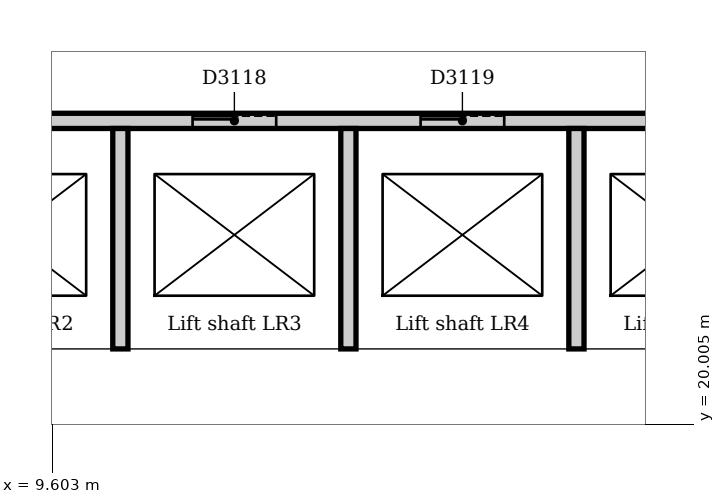
"""IFC4 building model, lengths in metres.
Left out: names, types, materials, properties, quantities, classifications, styles, units other than length and angle.
Written with IfcOpenShell. Run it as: python <this file> out.ifc"""

import sys

from ifc_helpers import new_model, si_unit, direction, frame, frame_2d, origin, place, context, subcontext, project, spatial, rectangle, extrude, element, fill, save


model = new_model("IFC4")
c1 = context("Model", 3, precision=1e-05, world=origin(), true_north=direction((0.0, 1.0)))
c2 = subcontext(c1, "Body", "Model", "MODEL_VIEW")
j1 = project(units=[si_unit("LENGTHUNIT", "METRE"), si_unit("PLANEANGLEUNIT", "RADIAN")], contexts=[c1])
p1 = place(None, origin())
s1 = spatial("IfcSite", under=j1, at=p1, CompositionType="ELEMENT")
p2 = place(p1, origin())
s2 = spatial("IfcBuilding", under=s1, at=p2, CompositionType="ELEMENT")
p3 = place(p2, frame((0.0, 0.0, 11.0)))
s3 = spatial("IfcBuildingStorey", under=s2, at=p3, CompositionType="ELEMENT", Elevation=11.0)
p4 = place(p3, frame((3.9, 20.4, 0.0), z_axis=(0.0, 0.0, 1.0), x_axis=(1.0, 0.0, 0.0)))
e1 = element("IfcWall", 1, at=p4, inside=s3, PredefinedType="SOLIDWALL", context=c2, shape_type="SweptSolid", body=[
    extrude(rectangle(XDim=19.8, YDim=1.2, at=frame_2d((9.9, 0.0))), origin(), (0.0, 0.0, 1.0), 5.0),
])
p5 = place(p3, frame((4.5, 24.0, 0.0), z_axis=(0.0, 0.0, 1.0), x_axis=(1.0, 0.0, 0.0)))
e2 = element("IfcWall", 2, at=p5, inside=s3, PredefinedType="PARTITIONING", context=c2, shape_type="SweptSolid", body=[
    extrude(rectangle(XDim=18.0, YDim=0.2, at=frame_2d((9.0, 0.0))), origin(), (0.0, 0.0, 1.0), 4.7),
])
p6 = place(p5, frame((0.95, 0.0, 0.0)))
e3 = element("IfcOpeningElement", 3, at=p6, cuts=e2, PredefinedType="OPENING", context=c2, shape_type="SweptSolid", body=[
    extrude(rectangle(XDim=1.1, YDim=2.1, at=frame_2d((0.55, 1.05))), frame((0.0, 0.11, 0.0), z_axis=(0.0, -1.0, 0.0), x_axis=(1.0, 0.0, 0.0)), (0.0, 0.0, 1.0), 0.22),
])
p7 = place(p5, frame((3.95, 0.0, 0.0)))
e4 = element("IfcOpeningElement", 4, at=p7, cuts=e2, PredefinedType="OPENING", context=c2, shape_type="SweptSolid", body=[
    extrude(rectangle(XDim=1.1, YDim=2.1, at=frame_2d((0.55, 1.05))), frame((0.0, 0.11, 0.0), z_axis=(0.0, -1.0, 0.0), x_axis=(1.0, 0.0, 0.0)), (0.0, 0.0, 1.0), 0.22),
])
p8 = place(p5, frame((6.95, 0.0, 0.0)))
e5 = element("IfcOpeningElement", 5, at=p8, cuts=e2, PredefinedType="OPENING", context=c2, shape_type="SweptSolid", body=[
    extrude(rectangle(XDim=1.1, YDim=2.1, at=frame_2d((0.55, 1.05))), frame((0.0, 0.11, 0.0), z_axis=(0.0, -1.0, 0.0), x_axis=(1.0, 0.0, 0.0)), (0.0, 0.0, 1.0), 0.22),
])
p9 = place(p5, frame((9.95, 0.0, 0.0)))
e6 = element("IfcOpeningElement", 6, at=p9, cuts=e2, PredefinedType="OPENING", context=c2, shape_type="SweptSolid", body=[
    extrude(rectangle(XDim=1.1, YDim=2.1, at=frame_2d((0.55, 1.05))), frame((0.0, 0.11, 0.0), z_axis=(0.0, -1.0, 0.0), x_axis=(1.0, 0.0, 0.0)), (0.0, 0.0, 1.0), 0.22),
])
p10 = place(p5, frame((12.95, 0.0, 0.0)))
e7 = element("IfcOpeningElement", 7, at=p10, cuts=e2, PredefinedType="OPENING", context=c2, shape_type="SweptSolid", body=[
    extrude(rectangle(XDim=1.1, YDim=2.1, at=frame_2d((0.55, 1.05))), frame((0.0, 0.11, 0.0), z_axis=(0.0, -1.0, 0.0), x_axis=(1.0, 0.0, 0.0)), (0.0, 0.0, 1.0), 0.22),
])
p11 = place(p5, frame((15.95, 0.0, 0.0)))
e8 = element("IfcOpeningElement", 8, at=p11, cuts=e2, PredefinedType="OPENING", context=c2, shape_type="SweptSolid", body=[
    extrude(rectangle(XDim=1.1, YDim=2.1, at=frame_2d((0.55, 1.05))), frame((0.0, 0.11, 0.0), z_axis=(0.0, -1.0, 0.0), x_axis=(1.0, 0.0, 0.0)), (0.0, 0.0, 1.0), 0.22),
])
for number, where, z_axis, x_axis in (
    (9, (10.5, 21.0, 0.0), (0.0, 0.0, 1.0), (0.0, 1.0, 0.0)),
    (10, (13.5, 21.0, 0.0), (0.0, 0.0, 1.0), (0.0, 1.0, 0.0)),
    (11, (16.5, 21.0, 0.0), (0.0, 0.0, 1.0), (0.0, 1.0, 0.0)),
):
    element("IfcWall", number, at=place(p3, frame(where, z_axis=z_axis, x_axis=x_axis)), inside=s3, PredefinedType="PARTITIONING", context=c2, shape_type="SweptSolid", body=[
        extrude(rectangle(XDim=2.9, YDim=0.2, at=frame_2d((1.45, 0.0))), origin(), (0.0, 0.0, 1.0), 4.7),
    ])
p12 = place(p8, origin())
e12 = element("IfcDoor", 12, at=p12, inside=s3, OperationType="SLIDING_TO_LEFT", PredefinedType="DOOR", context=c2, shape_type="SweptSolid", body=[
    extrude(rectangle(XDim=1.1, YDim=2.1, at=frame_2d((0.55, 1.05))), frame((0.0, 0.025, 0.0), z_axis=(0.0, -1.0, 0.0), x_axis=(1.0, 0.0, 0.0)), (0.0, 0.0, 1.0), 0.05),
])
fill(e5, e12)
p13 = place(p9, origin())
e13 = element("IfcDoor", 13, at=p13, inside=s3, OperationType="SLIDING_TO_LEFT", PredefinedType="DOOR", context=c2, shape_type="SweptSolid", body=[
    extrude(rectangle(XDim=1.1, YDim=2.1, at=frame_2d((0.55, 1.05))), frame((0.0, 0.025, 0.0), z_axis=(0.0, -1.0, 0.0), x_axis=(1.0, 0.0, 0.0)), (0.0, 0.0, 1.0), 0.05),
])
fill(e6, e13)
save(model, sys.argv[1])
